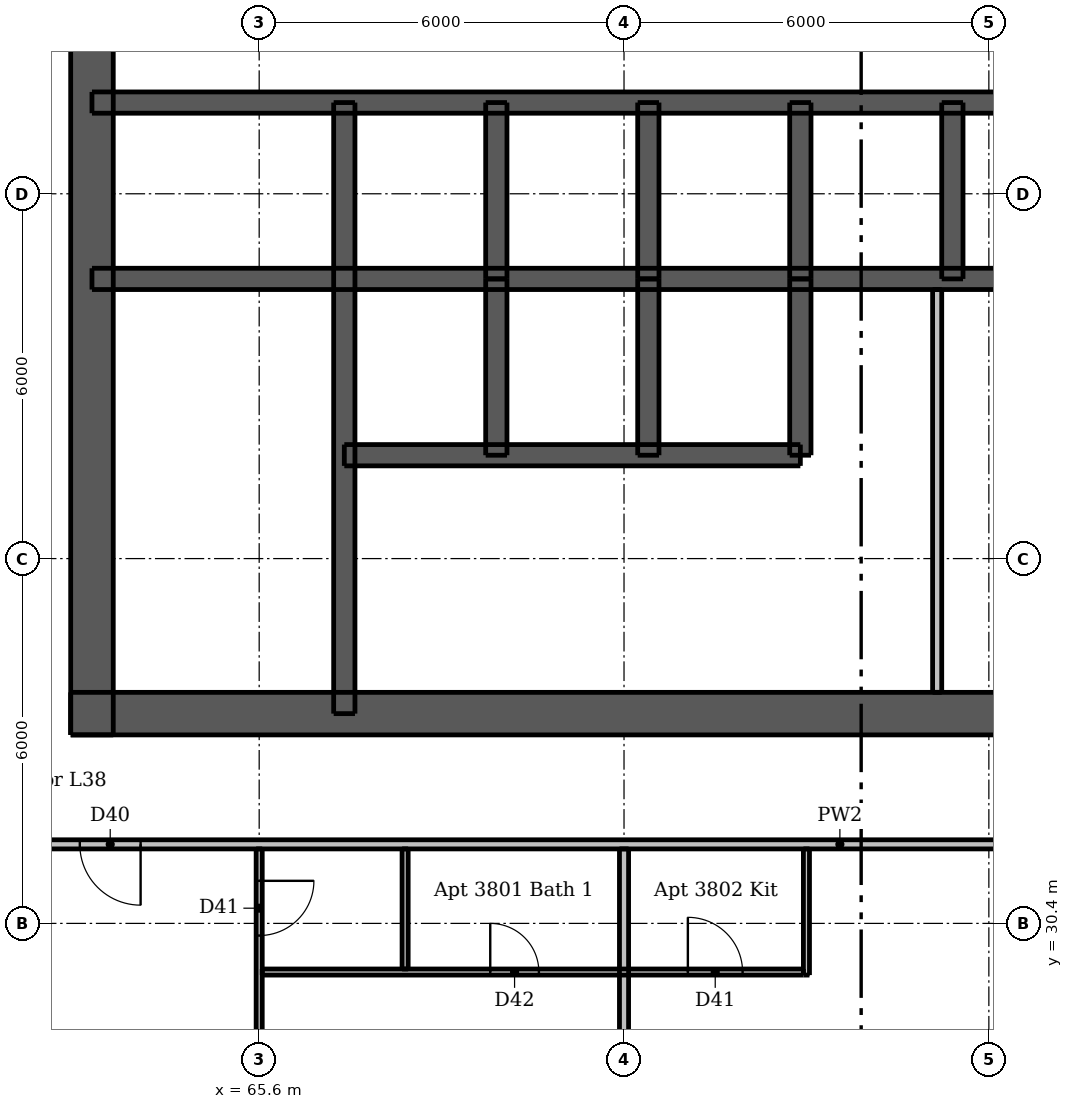
"""IFC4 building model, lengths in metres.
Left out: names, types, materials, properties, quantities, classifications, styles, units other than length and angle.
Written with IfcOpenShell. Run it as: python <this file> out.ifc"""

import sys

from ifc_helpers import new_model, si_unit, direction, frame, frame_2d, origin, place, context, subcontext, project, spatial, rectangle, extrude, element, fill, save


model = new_model("IFC4")
c1 = context("Model", 3, precision=1e-05, world=origin(), true_north=direction((0.0, 1.0)))
c2 = subcontext(c1, "Body", "Model", "MODEL_VIEW")
j1 = project(units=[si_unit("LENGTHUNIT", "METRE"), si_unit("PLANEANGLEUNIT", "RADIAN")], contexts=[c1])
p1 = place(None, origin())
s1 = spatial("IfcSite", under=j1, at=p1, CompositionType="ELEMENT")
p2 = place(p1, origin())
s2 = spatial("IfcBuilding", under=s1, at=p2, CompositionType="ELEMENT")
p3 = place(p2, frame((0.0, 0.0, 143.8)))
s3 = spatial("IfcBuildingStorey", under=s2, at=p3, CompositionType="ELEMENT", Elevation=143.8)
p4 = place(p3, frame((62.5, 33.85, 0.0), z_axis=(0.0, 0.0, 1.0), x_axis=(1.0, 0.0, 0.0)))
e1 = element("IfcWall", 1, at=p4, inside=s3, PredefinedType="SHEAR", context=c2, shape_type="SweptSolid", body=[
    extrude(rectangle(XDim=24.0, YDim=0.7, at=frame_2d((12.0, 0.0))), origin(), (0.0, 0.0, 1.0), 3.05),
])
p5 = place(p4, frame((1.962, 0.0, 0.0)))
e2 = element("IfcOpeningElement", 2, at=p5, cuts=e1, PredefinedType="OPENING", context=c2, shape_type="SweptSolid", body=[
    extrude(rectangle(XDim=1.1, YDim=2.1, at=frame_2d((0.55, 1.05))), frame((0.0, 0.36, 0.0), z_axis=(0.0, -1.0, 0.0), x_axis=(1.0, 0.0, 0.0)), (0.0, 0.0, 1.0), 0.72),
])
p6 = place(p4, frame((20.938, 0.0, 0.0)))
e3 = element("IfcOpeningElement", 3, at=p6, cuts=e1, PredefinedType="OPENING", context=c2, shape_type="SweptSolid", body=[
    extrude(rectangle(XDim=1.1, YDim=2.1, at=frame_2d((0.55, 1.05))), frame((0.0, 0.36, 0.0), z_axis=(0.0, -1.0, 0.0), x_axis=(1.0, 0.0, 0.0)), (0.0, 0.0, 1.0), 0.72),
])
p7 = place(p4, frame((8.0, 0.0, 0.0)))
e4 = element("IfcOpeningElement", 4, at=p7, cuts=e1, PredefinedType="OPENING", context=c2, shape_type="SweptSolid", body=[
    extrude(rectangle(XDim=1.1, YDim=2.1, at=frame_2d((0.55, 1.05))), frame((0.0, 0.36, 0.0), z_axis=(0.0, -1.0, 0.0), x_axis=(1.0, 0.0, 0.0)), (0.0, 0.0, 1.0), 0.72),
])
p8 = place(p4, frame((16.375, 0.0, 0.0)))
e5 = element("IfcOpeningElement", 5, at=p8, cuts=e1, PredefinedType="OPENING", context=c2, shape_type="SweptSolid", body=[
    extrude(rectangle(XDim=0.9, YDim=2.1, at=frame_2d((0.45, 1.05))), frame((0.0, 0.36, 0.0), z_axis=(0.0, -1.0, 0.0), x_axis=(1.0, 0.0, 0.0)), (0.0, 0.0, 1.0), 0.72),
])
p9 = place(p3, frame((62.85, 33.5, 0.0), z_axis=(0.0, 0.0, 1.0), x_axis=(0.0, 1.0, 0.0)))
e6 = element("IfcWall", 6, at=p9, inside=s3, PredefinedType="SHEAR", context=c2, shape_type="SweptSolid", body=[
    extrude(rectangle(XDim=24.0, YDim=0.7, at=frame_2d((12.0, 0.0))), origin(), (0.0, 0.0, 1.0), 3.05),
])
p10 = place(p9, frame((11.2, 0.0, 0.0)))
e7 = element("IfcOpeningElement", 7, at=p10, cuts=e6, PredefinedType="OPENING", context=c2, shape_type="SweptSolid", body=[
    extrude(rectangle(XDim=1.6, YDim=2.1, at=frame_2d((0.8, 1.05))), frame((0.0, 0.36, 0.0), z_axis=(0.0, -1.0, 0.0), x_axis=(1.0, 0.0, 0.0)), (0.0, 0.0, 1.0), 0.72),
])
p11 = place(p3, frame((62.85, 41.0, 0.0), z_axis=(0.0, 0.0, 1.0), x_axis=(1.0, 0.0, 0.0)))
e8 = element("IfcWall", 8, at=p11, inside=s3, PredefinedType="SHEAR", context=c2, shape_type="SweptSolid", body=[
    extrude(rectangle(XDim=23.3, YDim=0.35, at=frame_2d((11.65, 0.0))), origin(), (0.0, 0.0, 1.0), 3.05),
])
p12 = place(p3, frame((62.85, 43.9, 0.0), z_axis=(0.0, 0.0, 1.0), x_axis=(1.0, 0.0, 0.0)))
e9 = element("IfcWall", 9, at=p12, inside=s3, PredefinedType="SHEAR", context=c2, shape_type="SweptSolid", body=[
    extrude(rectangle(XDim=23.3, YDim=0.35, at=frame_2d((11.65, 0.0))), origin(), (0.0, 0.0, 1.0), 3.05),
])
p13 = place(p12, frame((1.712, 0.0, 0.0)))
e10 = element("IfcOpeningElement", 10, at=p13, cuts=e9, PredefinedType="OPENING", context=c2, shape_type="SweptSolid", body=[
    extrude(rectangle(XDim=0.9, YDim=2.1, at=frame_2d((0.45, 1.05))), frame((0.0, 0.185, 0.0), z_axis=(0.0, -1.0, 0.0), x_axis=(1.0, 0.0, 0.0)), (0.0, 0.0, 1.0), 0.37),
])
p14 = place(p12, frame((20.688, 0.0, 0.0)))
e11 = element("IfcOpeningElement", 11, at=p14, cuts=e9, PredefinedType="OPENING", context=c2, shape_type="SweptSolid", body=[
    extrude(rectangle(XDim=0.9, YDim=2.1, at=frame_2d((0.45, 1.05))), frame((0.0, 0.185, 0.0), z_axis=(0.0, -1.0, 0.0), x_axis=(1.0, 0.0, 0.0)), (0.0, 0.0, 1.0), 0.37),
])
p15 = place(p12, frame((4.85, 0.0, 0.0)))
e12 = element("IfcOpeningElement", 12, at=p15, cuts=e9, PredefinedType="OPENING", context=c2, shape_type="SweptSolid", body=[
    extrude(rectangle(XDim=1.1, YDim=2.1, at=frame_2d((0.55, 1.05))), frame((0.0, 0.185, 0.0), z_axis=(0.0, -1.0, 0.0), x_axis=(1.0, 0.0, 0.0)), (0.0, 0.0, 1.0), 0.37),
])
p16 = place(p12, frame((7.35, 0.0, 0.0)))
e13 = element("IfcOpeningElement", 13, at=p16, cuts=e9, PredefinedType="OPENING", context=c2, shape_type="SweptSolid", body=[
    extrude(rectangle(XDim=1.1, YDim=2.1, at=frame_2d((0.55, 1.05))), frame((0.0, 0.185, 0.0), z_axis=(0.0, -1.0, 0.0), x_axis=(1.0, 0.0, 0.0)), (0.0, 0.0, 1.0), 0.37),
])
p17 = place(p12, frame((9.85, 0.0, 0.0)))
e14 = element("IfcOpeningElement", 14, at=p17, cuts=e9, PredefinedType="OPENING", context=c2, shape_type="SweptSolid", body=[
    extrude(rectangle(XDim=1.1, YDim=2.1, at=frame_2d((0.55, 1.05))), frame((0.0, 0.185, 0.0), z_axis=(0.0, -1.0, 0.0), x_axis=(1.0, 0.0, 0.0)), (0.0, 0.0, 1.0), 0.37),
])
p18 = place(p12, frame((12.35, 0.0, 0.0)))
e15 = element("IfcOpeningElement", 15, at=p18, cuts=e9, PredefinedType="OPENING", context=c2, shape_type="SweptSolid", body=[
    extrude(rectangle(XDim=1.1, YDim=2.1, at=frame_2d((0.55, 1.05))), frame((0.0, 0.185, 0.0), z_axis=(0.0, -1.0, 0.0), x_axis=(1.0, 0.0, 0.0)), (0.0, 0.0, 1.0), 0.37),
])
p19 = place(p12, frame((14.85, 0.0, 0.0)))
e16 = element("IfcOpeningElement", 16, at=p19, cuts=e9, PredefinedType="OPENING", context=c2, shape_type="SweptSolid", body=[
    extrude(rectangle(XDim=1.1, YDim=2.1, at=frame_2d((0.55, 1.05))), frame((0.0, 0.185, 0.0), z_axis=(0.0, -1.0, 0.0), x_axis=(1.0, 0.0, 0.0)), (0.0, 0.0, 1.0), 0.37),
])
p20 = place(p12, frame((17.35, 0.0, 0.0)))
e17 = element("IfcOpeningElement", 17, at=p20, cuts=e9, PredefinedType="OPENING", context=c2, shape_type="SweptSolid", body=[
    extrude(rectangle(XDim=1.1, YDim=2.1, at=frame_2d((0.55, 1.05))), frame((0.0, 0.185, 0.0), z_axis=(0.0, -1.0, 0.0), x_axis=(1.0, 0.0, 0.0)), (0.0, 0.0, 1.0), 0.37),
])
p21 = place(p3, frame((67.0, 33.85, 0.0), z_axis=(0.0, 0.0, 1.0), x_axis=(0.0, 1.0, 0.0)))
e18 = element("IfcWall", 18, at=p21, inside=s3, PredefinedType="SHEAR", context=c2, shape_type="SweptSolid", body=[
    extrude(rectangle(XDim=10.05, YDim=0.35, at=frame_2d((5.025, 0.0))), origin(), (0.0, 0.0, 1.0), 3.05),
])
p22 = place(p21, frame((0.55, 0.0, 0.0)))
e19 = element("IfcOpeningElement", 19, at=p22, cuts=e18, PredefinedType="OPENING", context=c2, shape_type="SweptSolid", body=[
    extrude(rectangle(XDim=1.1, YDim=2.1, at=frame_2d((0.55, 1.05))), frame((0.0, 0.185, 0.0), z_axis=(0.0, -1.0, 0.0), x_axis=(1.0, 0.0, 0.0)), (0.0, 0.0, 1.0), 0.37),
])
for number, where, z_axis, x_axis in (
    (20, (69.5, 41.0, 0.0), (0.0, 0.0, 1.0), (0.0, 1.0, 0.0)),
    (21, (72.0, 41.0, 0.0), (0.0, 0.0, 1.0), (0.0, 1.0, 0.0)),
    (22, (74.5, 41.0, 0.0), (0.0, 0.0, 1.0), (0.0, 1.0, 0.0)),
    (23, (77.0, 41.0, 0.0), (0.0, 0.0, 1.0), (0.0, 1.0, 0.0)),
):
    element("IfcWall", number, at=place(p3, frame(where, z_axis=z_axis, x_axis=x_axis)), inside=s3, PredefinedType="SHEAR", context=c2, shape_type="SweptSolid", body=[
        extrude(rectangle(XDim=2.9, YDim=0.35, at=frame_2d((1.45, 0.0))), origin(), (0.0, 0.0, 1.0), 3.05),
    ])
p23 = place(p3, frame((67.0, 38.1, 0.0), z_axis=(0.0, 0.0, 1.0), x_axis=(1.0, 0.0, 0.0)))
e24 = element("IfcWall", 24, at=p23, inside=s3, PredefinedType="SHEAR", context=c2, shape_type="SweptSolid", body=[
    extrude(rectangle(XDim=7.5, YDim=0.35, at=frame_2d((3.75, 0.0))), origin(), (0.0, 0.0, 1.0), 3.05),
])
p24 = place(p23, frame((0.7, 0.0, 0.0)))
e25 = element("IfcOpeningElement", 25, at=p24, cuts=e24, PredefinedType="OPENING", context=c2, shape_type="SweptSolid", body=[
    extrude(rectangle(XDim=1.1, YDim=2.1, at=frame_2d((0.55, 1.05))), frame((0.0, 0.185, 0.0), z_axis=(0.0, -1.0, 0.0), x_axis=(1.0, 0.0, 0.0)), (0.0, 0.0, 1.0), 0.37),
])
p25 = place(p23, frame((3.2, 0.0, 0.0)))
e26 = element("IfcOpeningElement", 26, at=p25, cuts=e24, PredefinedType="OPENING", context=c2, shape_type="SweptSolid", body=[
    extrude(rectangle(XDim=1.1, YDim=2.1, at=frame_2d((0.55, 1.05))), frame((0.0, 0.185, 0.0), z_axis=(0.0, -1.0, 0.0), x_axis=(1.0, 0.0, 0.0)), (0.0, 0.0, 1.0), 0.37),
])
p26 = place(p23, frame((5.65, 0.0, 0.0)))
e27 = element("IfcOpeningElement", 27, at=p26, cuts=e24, PredefinedType="OPENING", context=c2, shape_type="SweptSolid", body=[
    extrude(rectangle(XDim=1.2, YDim=2.1, at=frame_2d((0.6, 1.05))), frame((0.0, 0.185, 0.0), z_axis=(0.0, -1.0, 0.0), x_axis=(1.0, 0.0, 0.0)), (0.0, 0.0, 1.0), 0.37),
])
for number, where, z_axis, x_axis in (
    (28, (69.5, 38.1, 0.0), (0.0, 0.0, 1.0), (0.0, 1.0, 0.0)),
    (29, (72.0, 38.1, 0.0), (0.0, 0.0, 1.0), (0.0, 1.0, 0.0)),
    (30, (74.5, 38.1, 0.0), (0.0, 0.0, 1.0), (0.0, 1.0, 0.0)),
):
    element("IfcWall", number, at=place(p3, frame(where, z_axis=z_axis, x_axis=x_axis)), inside=s3, PredefinedType="SHEAR", context=c2, shape_type="SweptSolid", body=[
        extrude(rectangle(XDim=2.9, YDim=0.35, at=frame_2d((1.45, 0.0))), origin(), (0.0, 0.0, 1.0), 3.05),
    ])
p27 = place(p3, frame((76.75, 34.2, 0.0), z_axis=(0.0, 0.0, 1.0), x_axis=(0.0, 1.0, 0.0)))
e31 = element("IfcWall", 31, at=p27, inside=s3, PredefinedType="PLUMBINGWALL", context=c2, shape_type="SweptSolid", body=[
    extrude(rectangle(XDim=6.625, YDim=0.15, at=frame_2d((3.312, 0.0))), origin(), (0.0, 0.0, 1.0), 3.05),
])
p28 = place(p3, frame((65.6, 31.625, 0.0), z_axis=(0.0, 0.0, 1.0), x_axis=(0.0, -1.0, 0.0)))
e32 = element("IfcWall", 32, at=p28, inside=s3, PredefinedType="PARTITIONING", context=c2, shape_type="SweptSolid", body=[
    extrude(rectangle(XDim=9.125, YDim=0.1, at=frame_2d((4.562, 0.0))), origin(), (0.0, 0.0, 1.0), 2.516),
])
p29 = place(p28, frame((0.525, 0.0, 0.0)))
e33 = element("IfcOpeningElement", 33, at=p29, cuts=e32, PredefinedType="OPENING", context=c2, shape_type="SweptSolid", body=[
    extrude(rectangle(XDim=0.9, YDim=2.1, at=frame_2d((0.45, 1.05))), frame((0.0, 0.06, 0.0), z_axis=(0.0, -1.0, 0.0), x_axis=(1.0, 0.0, 0.0)), (0.0, 0.0, 1.0), 0.12),
])
p30 = place(p28, frame((5.125, 0.0, 0.0)))
e34 = element("IfcOpeningElement", 34, at=p30, cuts=e32, PredefinedType="OPENING", context=c2, shape_type="SweptSolid", body=[
    extrude(rectangle(XDim=0.9, YDim=2.1, at=frame_2d((0.45, 1.05))), frame((0.0, 0.06, 0.0), z_axis=(0.0, -1.0, 0.0), x_axis=(1.0, 0.0, 0.0)), (0.0, 0.0, 1.0), 0.12),
])
p31 = place(p3, frame((68.0, 29.65, 0.0), z_axis=(0.0, 0.0, 1.0), x_axis=(0.0, 1.0, 0.0)))
e35 = element("IfcWall", 35, at=p31, inside=s3, PredefinedType="PARTITIONING", context=c2, shape_type="SweptSolid", body=[
    extrude(rectangle(XDim=1.975, YDim=0.1, at=frame_2d((0.988, 0.0))), origin(), (0.0, 0.0, 1.0), 3.05),
])
p32 = place(p3, frame((74.6, 29.55, 0.0), z_axis=(0.0, 0.0, 1.0), x_axis=(0.0, 1.0, 0.0)))
e36 = element("IfcWall", 36, at=p32, inside=s3, PredefinedType="PARTITIONING", context=c2, shape_type="SweptSolid", body=[
    extrude(rectangle(XDim=2.075, YDim=0.1, at=frame_2d((1.038, 0.0))), origin(), (0.0, 0.0, 1.0), 3.05),
])
p33 = place(p3, frame((65.65, 29.6, 0.0), z_axis=(0.0, 0.0, 1.0), x_axis=(1.0, 0.0, 0.0)))
e37 = element("IfcWall", 37, at=p33, inside=s3, PredefinedType="PARTITIONING", context=c2, shape_type="SweptSolid", body=[
    extrude(rectangle(XDim=8.9, YDim=0.1, at=frame_2d((4.45, 0.0))), origin(), (0.0, 0.0, 1.0), 3.05),
])
p34 = place(p33, frame((3.75, 0.0, 0.0)))
e38 = element("IfcOpeningElement", 38, at=p34, cuts=e37, PredefinedType="OPENING", context=c2, shape_type="SweptSolid", body=[
    extrude(rectangle(XDim=0.8, YDim=2.1, at=frame_2d((0.4, 1.05))), frame((0.0, 0.06, 0.0), z_axis=(0.0, -1.0, 0.0), x_axis=(1.0, 0.0, 0.0)), (0.0, 0.0, 1.0), 0.12),
])
p35 = place(p33, frame((7.0, 0.0, 0.0)))
e39 = element("IfcOpeningElement", 39, at=p35, cuts=e37, PredefinedType="OPENING", context=c2, shape_type="SweptSolid", body=[
    extrude(rectangle(XDim=0.9, YDim=2.1, at=frame_2d((0.45, 1.05))), frame((0.0, 0.06, 0.0), z_axis=(0.0, -1.0, 0.0), x_axis=(1.0, 0.0, 0.0)), (0.0, 0.0, 1.0), 0.12),
])
p36 = place(p3, frame((71.6, 24.0, 0.0), z_axis=(0.0, 0.0, 1.0), x_axis=(0.0, 1.0, 0.0)))
e40 = element("IfcWall", 40, at=p36, inside=s3, PredefinedType="PARTITIONING", context=c2, shape_type="SweptSolid", body=[
    extrude(rectangle(XDim=7.625, YDim=0.15, at=frame_2d((3.812, 0.0))), origin(), (0.0, 0.0, 1.0), 2.59),
])
p37 = place(p3, frame((89.525, 31.7, 0.0), z_axis=(0.0, 0.0, 1.0), x_axis=(-1.0, 0.0, 0.0)))
e41 = element("IfcWall", 41, at=p37, inside=s3, PredefinedType="PARTITIONING", context=c2, shape_type="SweptSolid", body=[
    extrude(rectangle(XDim=28.75, YDim=0.15, at=frame_2d((14.375, 0.0))), origin(), (0.0, 0.0, 1.0), 3.05),
])
p38 = place(p37, frame((25.875, 0.0, 0.0)))
e42 = element("IfcOpeningElement", 42, at=p38, cuts=e41, PredefinedType="OPENING", context=c2, shape_type="SweptSolid", body=[
    extrude(rectangle(XDim=1.0, YDim=2.1, at=frame_2d((0.5, 1.05))), frame((0.0, 0.085, 0.0), z_axis=(0.0, -1.0, 0.0), x_axis=(1.0, 0.0, 0.0)), (0.0, 0.0, 1.0), 0.17),
])
p39 = place(p37, frame((9.925, 0.0, 0.0)))
e43 = element("IfcOpeningElement", 43, at=p39, cuts=e41, PredefinedType="OPENING", context=c2, shape_type="SweptSolid", body=[
    extrude(rectangle(XDim=1.0, YDim=2.1, at=frame_2d((0.5, 1.05))), frame((0.0, 0.085, 0.0), z_axis=(0.0, -1.0, 0.0), x_axis=(1.0, 0.0, 0.0)), (0.0, 0.0, 1.0), 0.17),
])
p40 = place(p5, origin())
e44 = element("IfcDoor", 44, at=p40, inside=s3, OperationType="SINGLE_SWING_LEFT", PredefinedType="DOOR", context=c2, shape_type="SweptSolid", body=[
    extrude(rectangle(XDim=1.1, YDim=2.1, at=frame_2d((0.55, 1.05))), frame((0.0, 0.337, 0.0), z_axis=(0.0, -1.0, 0.0), x_axis=(1.0, 0.0, 0.0)), (0.0, 0.0, 1.0), 0.05),
])
fill(e2, e44)
p41 = place(p10, origin())
e45 = element("IfcDoor", 45, at=p41, inside=s3, OperationType="DOUBLE_DOOR_SINGLE_SWING", PredefinedType="DOOR", context=c2, shape_type="SweptSolid", body=[
    extrude(rectangle(XDim=1.6, YDim=2.1, at=frame_2d((0.8, 1.05))), frame((0.0, -0.288, 0.0), z_axis=(0.0, -1.0, 0.0), x_axis=(1.0, 0.0, 0.0)), (0.0, 0.0, 1.0), 0.05),
])
fill(e7, e45)
p42 = place(p7, origin())
e46 = element("IfcDoor", 46, at=p42, inside=s3, OperationType="SINGLE_SWING_LEFT", PredefinedType="DOOR", context=c2, shape_type="SweptSolid", body=[
    extrude(rectangle(XDim=1.1, YDim=2.1, at=frame_2d((0.55, 1.05))), frame((0.0, 0.337, 0.0), z_axis=(0.0, -1.0, 0.0), x_axis=(1.0, 0.0, 0.0)), (0.0, 0.0, 1.0), 0.05),
])
fill(e4, e46)
p43 = place(p22, origin())
e47 = element("IfcDoor", 47, at=p43, inside=s3, OperationType="SINGLE_SWING_RIGHT", PredefinedType="DOOR", context=c2, shape_type="SweptSolid", body=[
    extrude(rectangle(XDim=1.1, YDim=2.1, at=frame_2d((0.55, 1.05))), frame((0.0, -0.112, 0.0), z_axis=(0.0, -1.0, 0.0), x_axis=(1.0, 0.0, 0.0)), (0.0, 0.0, 1.0), 0.05),
])
fill(e19, e47)
p44 = place(p13, origin())
e48 = element("IfcDoor", 48, at=p44, inside=s3, OperationType="SINGLE_SWING_LEFT", PredefinedType="DOOR", context=c2, shape_type="SweptSolid", body=[
    extrude(rectangle(XDim=0.9, YDim=2.1, at=frame_2d((0.45, 1.05))), frame((0.0, -0.112, 0.0), z_axis=(0.0, -1.0, 0.0), x_axis=(1.0, 0.0, 0.0)), (0.0, 0.0, 1.0), 0.05),
])
fill(e10, e48)
p45 = place(p15, origin())
e49 = element("IfcDoor", 49, at=p45, inside=s3, OperationType="DOUBLE_DOOR_SLIDING", PredefinedType="DOOR", context=c2, shape_type="SweptSolid", body=[
    extrude(rectangle(XDim=1.1, YDim=2.1, at=frame_2d((0.55, 1.05))), frame((0.0, 0.025, 0.0), z_axis=(0.0, -1.0, 0.0), x_axis=(1.0, 0.0, 0.0)), (0.0, 0.0, 1.0), 0.05),
])
fill(e12, e49)
p46 = place(p16, origin())
e50 = element("IfcDoor", 50, at=p46, inside=s3, OperationType="DOUBLE_DOOR_SLIDING", PredefinedType="DOOR", context=c2, shape_type="SweptSolid", body=[
    extrude(rectangle(XDim=1.1, YDim=2.1, at=frame_2d((0.55, 1.05))), frame((0.0, 0.025, 0.0), z_axis=(0.0, -1.0, 0.0), x_axis=(1.0, 0.0, 0.0)), (0.0, 0.0, 1.0), 0.05),
])
fill(e13, e50)
p47 = place(p17, origin())
e51 = element("IfcDoor", 51, at=p47, inside=s3, OperationType="DOUBLE_DOOR_SLIDING", PredefinedType="DOOR", context=c2, shape_type="SweptSolid", body=[
    extrude(rectangle(XDim=1.1, YDim=2.1, at=frame_2d((0.55, 1.05))), frame((0.0, 0.025, 0.0), z_axis=(0.0, -1.0, 0.0), x_axis=(1.0, 0.0, 0.0)), (0.0, 0.0, 1.0), 0.05),
])
fill(e14, e51)
p48 = place(p18, origin())
e52 = element("IfcDoor", 52, at=p48, inside=s3, OperationType="DOUBLE_DOOR_SLIDING", PredefinedType="DOOR", context=c2, shape_type="SweptSolid", body=[
    extrude(rectangle(XDim=1.1, YDim=2.1, at=frame_2d((0.55, 1.05))), frame((0.0, 0.025, 0.0), z_axis=(0.0, -1.0, 0.0), x_axis=(1.0, 0.0, 0.0)), (0.0, 0.0, 1.0), 0.05),
])
fill(e15, e52)
p49 = place(p24, origin())
e53 = element("IfcDoor", 53, at=p49, inside=s3, OperationType="DOUBLE_DOOR_SLIDING", PredefinedType="DOOR", context=c2, shape_type="SweptSolid", body=[
    extrude(rectangle(XDim=1.1, YDim=2.1, at=frame_2d((0.55, 1.05))), frame((0.0, 0.025, 0.0), z_axis=(0.0, -1.0, 0.0), x_axis=(1.0, 0.0, 0.0)), (0.0, 0.0, 1.0), 0.05),
])
fill(e25, e53)
p50 = place(p25, origin())
e54 = element("IfcDoor", 54, at=p50, inside=s3, OperationType="DOUBLE_DOOR_SLIDING", PredefinedType="DOOR", context=c2, shape_type="SweptSolid", body=[
    extrude(rectangle(XDim=1.1, YDim=2.1, at=frame_2d((0.55, 1.05))), frame((0.0, 0.025, 0.0), z_axis=(0.0, -1.0, 0.0), x_axis=(1.0, 0.0, 0.0)), (0.0, 0.0, 1.0), 0.05),
])
fill(e26, e54)
p51 = place(p26, origin())
e55 = element("IfcDoor", 55, at=p51, inside=s3, OperationType="DOUBLE_DOOR_SLIDING", PredefinedType="DOOR", context=c2, shape_type="SweptSolid", body=[
    extrude(rectangle(XDim=1.2, YDim=2.1, at=frame_2d((0.6, 1.05))), frame((0.0, 0.025, 0.0), z_axis=(0.0, -1.0, 0.0), x_axis=(1.0, 0.0, 0.0)), (0.0, 0.0, 1.0), 0.05),
])
fill(e27, e55)
p52 = place(p38, origin())
e56 = element("IfcDoor", 56, at=p52, inside=s3, OperationType="SINGLE_SWING_LEFT", PredefinedType="DOOR", context=c2, shape_type="SweptSolid", body=[
    extrude(rectangle(XDim=1.0, YDim=2.1, at=frame_2d((0.5, 1.05))), frame((0.0, 0.025, 0.0), z_axis=(0.0, -1.0, 0.0), x_axis=(1.0, 0.0, 0.0)), (0.0, 0.0, 1.0), 0.05),
])
fill(e42, e56)
p53 = place(p29, origin())
e57 = element("IfcDoor", 57, at=p53, inside=s3, OperationType="SINGLE_SWING_LEFT", PredefinedType="DOOR", context=c2, shape_type="SweptSolid", body=[
    extrude(rectangle(XDim=0.9, YDim=2.1, at=frame_2d((0.45, 1.05))), frame((0.0, 0.025, 0.0), z_axis=(0.0, -1.0, 0.0), x_axis=(1.0, 0.0, 0.0)), (0.0, 0.0, 1.0), 0.05),
])
fill(e33, e57)
p54 = place(p34, origin())
e58 = element("IfcDoor", 58, at=p54, inside=s3, OperationType="SINGLE_SWING_LEFT", PredefinedType="DOOR", context=c2, shape_type="SweptSolid", body=[
    extrude(rectangle(XDim=0.8, YDim=2.1, at=frame_2d((0.4, 1.05))), frame((0.0, 0.025, 0.0), z_axis=(0.0, -1.0, 0.0), x_axis=(1.0, 0.0, 0.0)), (0.0, 0.0, 1.0), 0.05),
])
fill(e38, e58)
p55 = place(p35, origin())
e59 = element("IfcDoor", 59, at=p55, inside=s3, OperationType="SINGLE_SWING_LEFT", PredefinedType="DOOR", context=c2, shape_type="SweptSolid", body=[
    extrude(rectangle(XDim=0.9, YDim=2.1, at=frame_2d((0.45, 1.05))), frame((0.0, 0.025, 0.0), z_axis=(0.0, -1.0, 0.0), x_axis=(1.0, 0.0, 0.0)), (0.0, 0.0, 1.0), 0.05),
])
fill(e39, e59)
save(model, sys.argv[1])
